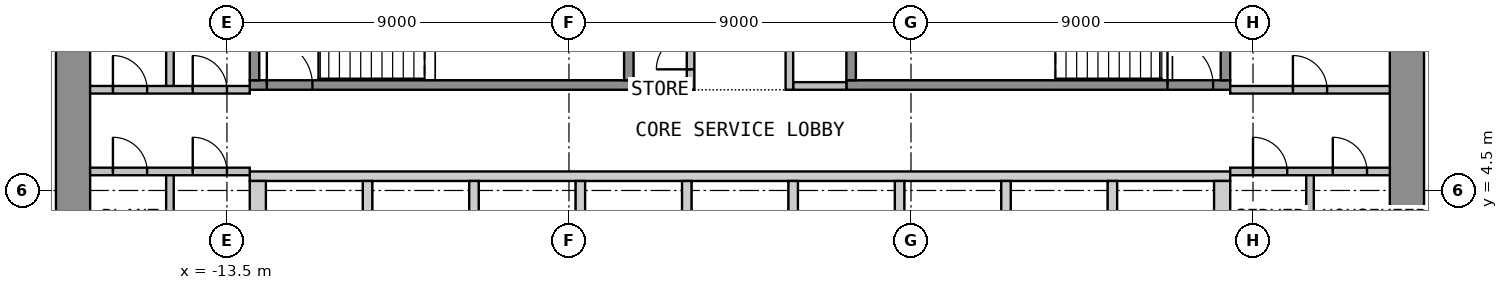
"""IFC4 building model, lengths in metres.
Left out: names, types, materials, properties, quantities, classifications, styles, units other than length and angle.
Written with IfcOpenShell. Run it as: python <this file> out.ifc"""

import sys

from ifc_helpers import new_model, si_unit, direction, frame, frame_2d, origin, place, context, subcontext, project, spatial, polyline, rectangle, outline, extrude, element, fill, save


model = new_model("IFC4")
c1 = context("Model", 3, precision=1e-05, world=origin(), true_north=direction((0.0, 1.0)))
c2 = subcontext(c1, "Body", "Model", "MODEL_VIEW")
j1 = project(units=[si_unit("LENGTHUNIT", "METRE"), si_unit("PLANEANGLEUNIT", "RADIAN")], contexts=[c1])
p1 = place(None, origin())
s1 = spatial("IfcSite", under=j1, at=p1, CompositionType="ELEMENT")
p2 = place(p1, origin())
s2 = spatial("IfcBuilding", under=s1, at=p2, CompositionType="ELEMENT")
p3 = place(p2, frame((0.0, 0.0, 81.3)))
s3 = spatial("IfcBuildingStorey", under=s2, at=p3, CompositionType="ELEMENT", Elevation=81.3)
p4 = place(p3, frame((-17.55, -12.6, 0.0), z_axis=(0.0, 0.0, 1.0), x_axis=(0.0, 1.0, 0.0)))
e1 = element("IfcWall", 1, at=p4, inside=s3, PredefinedType="SHEAR", context=c2, shape_type="SweptSolid", body=[
    extrude(rectangle(XDim=25.2, YDim=0.9, at=frame_2d((12.6, 0.0))), origin(), (0.0, 0.0, 1.0), 3.525),
])
p5 = place(p4, frame((11.4, 0.0, 0.0)))
e2 = element("IfcOpeningElement", 2, at=p5, cuts=e1, PredefinedType="OPENING", context=c2, shape_type="SweptSolid", body=[
    extrude(rectangle(XDim=2.4, YDim=2.1, at=frame_2d((1.2, 1.05))), frame((0.0, 0.46, 0.0), z_axis=(0.0, -1.0, 0.0), x_axis=(1.0, 0.0, 0.0)), (0.0, 0.0, 1.0), 0.92),
])
p6 = place(p3, frame((17.55, -12.6, 0.0), z_axis=(0.0, 0.0, 1.0), x_axis=(0.0, 1.0, 0.0)))
e3 = element("IfcWall", 3, at=p6, inside=s3, PredefinedType="SHEAR", context=c2, shape_type="SweptSolid", body=[
    extrude(rectangle(XDim=25.2, YDim=0.9, at=frame_2d((12.6, 0.0))), origin(), (0.0, 0.0, 1.0), 3.525),
])
p7 = place(p6, frame((11.4, 0.0, 0.0)))
e4 = element("IfcOpeningElement", 4, at=p7, cuts=e3, PredefinedType="OPENING", context=c2, shape_type="SweptSolid", body=[
    extrude(rectangle(XDim=2.4, YDim=2.1, at=frame_2d((1.2, 1.05))), frame((0.0, 0.46, 0.0), z_axis=(0.0, -1.0, 0.0), x_axis=(1.0, 0.0, 0.0)), (0.0, 0.0, 1.0), 0.92),
])
p8 = place(p3, origin())
e5 = element("IfcWall", 5, at=p8, inside=s3, PredefinedType="SHEAR", context=c2, shape_type="SweptSolid", body=[
    extrude(outline(polyline([(-12.9, 4.75), (12.9, 4.75), (12.9, 5.0), (-12.9, 5.0), (-12.9, 4.75)])), origin(), (0.0, 0.0, 1.0), 3.525),
])
p9 = place(p3, origin())
e6 = element("IfcWall", 6, at=p9, inside=s3, PredefinedType="SHEAR", context=c2, shape_type="SweptSolid", body=[
    extrude(outline(polyline([(-12.9, 2.05), (-12.475, 2.05), (-12.475, 4.75), (-12.9, 4.75), (-12.9, 2.05)])), origin(), (0.0, 0.0, 1.0), 3.525),
])
p10 = place(p3, origin())
e7 = element("IfcWall", 7, at=p10, inside=s3, PredefinedType="SHEAR", context=c2, shape_type="SweptSolid", body=[
    extrude(outline(polyline([(-9.925, 2.05), (-9.675, 2.05), (-9.675, 4.75), (-9.925, 4.75), (-9.925, 2.05)])), origin(), (0.0, 0.0, 1.0), 3.525),
])
p11 = place(p3, origin())
e8 = element("IfcWall", 8, at=p11, inside=s3, PredefinedType="SHEAR", context=c2, shape_type="SweptSolid", body=[
    extrude(outline(polyline([(-7.125, 2.05), (-6.875, 2.05), (-6.875, 4.75), (-7.125, 4.75), (-7.125, 2.05)])), origin(), (0.0, 0.0, 1.0), 3.525),
])
p12 = place(p3, origin())
e9 = element("IfcWall", 9, at=p12, inside=s3, PredefinedType="SHEAR", context=c2, shape_type="SweptSolid", body=[
    extrude(outline(polyline([(-4.325, 2.05), (-4.075, 2.05), (-4.075, 4.75), (-4.325, 4.75), (-4.325, 2.05)])), origin(), (0.0, 0.0, 1.0), 3.525),
])
p13 = place(p3, origin())
e10 = element("IfcWall", 10, at=p13, inside=s3, PredefinedType="SHEAR", context=c2, shape_type="SweptSolid", body=[
    extrude(outline(polyline([(-1.525, 2.05), (-1.275, 2.05), (-1.275, 4.75), (-1.525, 4.75), (-1.525, 2.05)])), origin(), (0.0, 0.0, 1.0), 3.525),
])
p14 = place(p3, origin())
e11 = element("IfcWall", 11, at=p14, inside=s3, PredefinedType="SHEAR", context=c2, shape_type="SweptSolid", body=[
    extrude(outline(polyline([(1.275, 2.05), (1.525, 2.05), (1.525, 4.75), (1.275, 4.75), (1.275, 2.05)])), origin(), (0.0, 0.0, 1.0), 3.525),
])
p15 = place(p3, origin())
e12 = element("IfcWall", 12, at=p15, inside=s3, PredefinedType="SHEAR", context=c2, shape_type="SweptSolid", body=[
    extrude(outline(polyline([(4.075, 2.05), (4.325, 2.05), (4.325, 4.75), (4.075, 4.75), (4.075, 2.05)])), origin(), (0.0, 0.0, 1.0), 3.525),
])
p16 = place(p3, origin())
e13 = element("IfcWall", 13, at=p16, inside=s3, PredefinedType="SHEAR", context=c2, shape_type="SweptSolid", body=[
    extrude(outline(polyline([(6.875, 2.05), (7.125, 2.05), (7.125, 4.75), (6.875, 4.75), (6.875, 2.05)])), origin(), (0.0, 0.0, 1.0), 3.525),
])
p17 = place(p3, origin())
e14 = element("IfcWall", 14, at=p17, inside=s3, PredefinedType="SHEAR", context=c2, shape_type="SweptSolid", body=[
    extrude(outline(polyline([(9.675, 2.05), (9.925, 2.05), (9.925, 4.75), (9.675, 4.75), (9.675, 2.05)])), origin(), (0.0, 0.0, 1.0), 3.525),
])
p18 = place(p3, origin())
e15 = element("IfcWall", 15, at=p18, inside=s3, PredefinedType="SHEAR", context=c2, shape_type="SweptSolid", body=[
    extrude(outline(polyline([(12.475, 2.05), (12.9, 2.05), (12.9, 4.75), (12.475, 4.75), (12.475, 2.05)])), origin(), (0.0, 0.0, 1.0), 3.525),
])
p19 = place(p3, frame((-12.9, 7.275, 0.0), z_axis=(0.0, 0.0, 1.0), x_axis=(1.0, 0.0, 0.0)))
e16 = element("IfcWall", 16, at=p19, inside=s3, PredefinedType="SHEAR", context=c2, shape_type="SweptSolid", body=[
    extrude(rectangle(XDim=10.1, YDim=0.25, at=frame_2d((5.05, 0.0))), origin(), (0.0, 0.0, 1.0), 3.525),
])
p20 = place(p19, frame((0.45, 0.0, 0.0)))
e17 = element("IfcOpeningElement", 17, at=p20, cuts=e16, PredefinedType="OPENING", context=c2, shape_type="SweptSolid", body=[
    extrude(rectangle(XDim=1.2, YDim=2.1, at=frame_2d((0.6, 1.05))), frame((0.0, 0.135, 0.0), z_axis=(0.0, -1.0, 0.0), x_axis=(1.0, 0.0, 0.0)), (0.0, 0.0, 1.0), 0.27),
])
for number, where, z_axis, x_axis in (
    (18, (-12.775, 7.4, 0.0), (0.0, 0.0, 1.0), (0.0, 1.0, 0.0)),
    (19, (-2.925, 7.4, 0.0), (0.0, 0.0, 1.0), (0.0, 1.0, 0.0)),
):
    element("IfcWall", number, at=place(p3, frame(where, z_axis=z_axis, x_axis=x_axis)), inside=s3, PredefinedType="SHEAR", context=c2, shape_type="SweptSolid", body=[
        extrude(rectangle(XDim=3.25, YDim=0.25, at=frame_2d((1.625, 0.0))), origin(), (0.0, 0.0, 1.0), 3.525),
    ])
p21 = place(p3, frame((2.8, 7.275, 0.0), z_axis=(0.0, 0.0, 1.0), x_axis=(1.0, 0.0, 0.0)))
e20 = element("IfcWall", 20, at=p21, inside=s3, PredefinedType="SHEAR", context=c2, shape_type="SweptSolid", body=[
    extrude(rectangle(XDim=10.1, YDim=0.25, at=frame_2d((5.05, 0.0))), origin(), (0.0, 0.0, 1.0), 3.525),
])
p22 = place(p21, frame((8.45, 0.0, 0.0)))
e21 = element("IfcOpeningElement", 21, at=p22, cuts=e20, PredefinedType="OPENING", context=c2, shape_type="SweptSolid", body=[
    extrude(rectangle(XDim=1.2, YDim=2.1, at=frame_2d((0.6, 1.05))), frame((0.0, 0.135, 0.0), z_axis=(0.0, -1.0, 0.0), x_axis=(1.0, 0.0, 0.0)), (0.0, 0.0, 1.0), 0.27),
])
for number, where, z_axis, x_axis in (
    (22, (2.925, 7.4, 0.0), (0.0, 0.0, 1.0), (0.0, 1.0, 0.0)),
    (23, (12.775, 7.4, 0.0), (0.0, 0.0, 1.0), (0.0, 1.0, 0.0)),
):
    element("IfcWall", number, at=place(p3, frame(where, z_axis=z_axis, x_axis=x_axis)), inside=s3, PredefinedType="SHEAR", context=c2, shape_type="SweptSolid", body=[
        extrude(rectangle(XDim=3.25, YDim=0.25, at=frame_2d((1.625, 0.0))), origin(), (0.0, 0.0, 1.0), 3.525),
    ])
for number, where, z_axis, x_axis in (
    (24, (-2.8, 7.25, 0.0), (0.0, 0.0, 1.0), (1.0, 0.0, 0.0)),
    (25, (1.4, 7.25, 0.0), (0.0, 0.0, 1.0), (1.0, 0.0, 0.0)),
):
    element("IfcWall", number, at=place(p3, frame(where, z_axis=z_axis, x_axis=x_axis)), inside=s3, PredefinedType="PARTITIONING", context=c2, shape_type="SweptSolid", body=[
        extrude(rectangle(XDim=1.4, YDim=0.2, at=frame_2d((0.7, 0.0))), origin(), (0.0, 0.0, 1.0), 3.525),
    ])
p23 = place(p3, frame((-1.3, 7.15, 0.0), z_axis=(0.0, 0.0, 1.0), x_axis=(0.0, 1.0, 0.0)))
e26 = element("IfcWall", 26, at=p23, inside=s3, PredefinedType="PARTITIONING", context=c2, shape_type="SweptSolid", body=[
    extrude(rectangle(XDim=5.45, YDim=0.2, at=frame_2d((2.725, 0.0))), origin(), (0.0, 0.0, 1.0), 3.525),
])
p24 = place(p23, frame((0.538, 0.0, 0.0)))
e27 = element("IfcOpeningElement", 27, at=p24, cuts=e26, PredefinedType="OPENING", context=c2, shape_type="SweptSolid", body=[
    extrude(rectangle(XDim=0.9, YDim=2.1, at=frame_2d((0.45, 1.05))), frame((0.0, 0.11, 0.0), z_axis=(0.0, -1.0, 0.0), x_axis=(1.0, 0.0, 0.0)), (0.0, 0.0, 1.0), 0.22),
])
p25 = place(p23, frame((3.163, 0.0, 0.0)))
e28 = element("IfcOpeningElement", 28, at=p25, cuts=e26, PredefinedType="OPENING", context=c2, shape_type="SweptSolid", body=[
    extrude(rectangle(XDim=0.9, YDim=2.1, at=frame_2d((0.45, 1.05))), frame((0.0, 0.11, 0.0), z_axis=(0.0, -1.0, 0.0), x_axis=(1.0, 0.0, 0.0)), (0.0, 0.0, 1.0), 0.22),
])
p26 = place(p3, frame((1.3, 7.15, 0.0), z_axis=(0.0, 0.0, 1.0), x_axis=(0.0, 1.0, 0.0)))
e29 = element("IfcWall", 29, at=p26, inside=s3, PredefinedType="PARTITIONING", context=c2, shape_type="SweptSolid", body=[
    extrude(rectangle(XDim=5.45, YDim=0.2, at=frame_2d((2.725, 0.0))), origin(), (0.0, 0.0, 1.0), 3.525),
])
p27 = place(p26, frame((2.375, 0.0, 0.0)))
e30 = element("IfcOpeningElement", 30, at=p27, cuts=e29, PredefinedType="OPENING", context=c2, shape_type="SweptSolid", body=[
    extrude(rectangle(XDim=0.9, YDim=2.1, at=frame_2d((0.45, 1.05))), frame((0.0, 0.11, 0.0), z_axis=(0.0, -1.0, 0.0), x_axis=(1.0, 0.0, 0.0)), (0.0, 0.0, 1.0), 0.22),
])
p28 = place(p3, frame((-15.0, 7.15, 0.0), z_axis=(0.0, 0.0, 1.0), x_axis=(0.0, 1.0, 0.0)))
e31 = element("IfcWall", 31, at=p28, inside=s3, PredefinedType="PARTITIONING", context=c2, shape_type="SweptSolid", body=[
    extrude(rectangle(XDim=5.45, YDim=0.2, at=frame_2d((2.725, 0.0))), origin(), (0.0, 0.0, 1.0), 3.525),
])
p29 = place(p3, frame((-17.1, 7.15, 0.0), z_axis=(0.0, 0.0, 1.0), x_axis=(1.0, 0.0, 0.0)))
e32 = element("IfcWall", 32, at=p29, inside=s3, PredefinedType="PARTITIONING", context=c2, shape_type="SweptSolid", body=[
    extrude(rectangle(XDim=4.2, YDim=0.2, at=frame_2d((2.1, 0.0))), origin(), (0.0, 0.0, 1.0), 3.525),
])
p30 = place(p29, frame((0.6, 0.0, 0.0)))
e33 = element("IfcOpeningElement", 33, at=p30, cuts=e32, PredefinedType="OPENING", context=c2, shape_type="SweptSolid", body=[
    extrude(rectangle(XDim=0.9, YDim=2.1, at=frame_2d((0.45, 1.05))), frame((0.0, 0.11, 0.0), z_axis=(0.0, -1.0, 0.0), x_axis=(1.0, 0.0, 0.0)), (0.0, 0.0, 1.0), 0.22),
])
p31 = place(p29, frame((2.7, 0.0, 0.0)))
e34 = element("IfcOpeningElement", 34, at=p31, cuts=e32, PredefinedType="OPENING", context=c2, shape_type="SweptSolid", body=[
    extrude(rectangle(XDim=0.9, YDim=2.1, at=frame_2d((0.45, 1.05))), frame((0.0, 0.11, 0.0), z_axis=(0.0, -1.0, 0.0), x_axis=(1.0, 0.0, 0.0)), (0.0, 0.0, 1.0), 0.22),
])
p32 = place(p3, frame((-15.0, 1.8, 0.0), z_axis=(0.0, 0.0, 1.0), x_axis=(0.0, 1.0, 0.0)))
e35 = element("IfcWall", 35, at=p32, inside=s3, PredefinedType="PARTITIONING", context=c2, shape_type="SweptSolid", body=[
    extrude(rectangle(XDim=3.2, YDim=0.2, at=frame_2d((1.6, 0.0))), origin(), (0.0, 0.0, 1.0), 3.525),
])
p33 = place(p3, frame((-17.1, 5.0, 0.0), z_axis=(0.0, 0.0, 1.0), x_axis=(1.0, 0.0, 0.0)))
e36 = element("IfcWall", 36, at=p33, inside=s3, PredefinedType="PARTITIONING", context=c2, shape_type="SweptSolid", body=[
    extrude(rectangle(XDim=4.2, YDim=0.2, at=frame_2d((2.1, 0.0))), origin(), (0.0, 0.0, 1.0), 3.525),
])
p34 = place(p33, frame((0.6, 0.0, 0.0)))
e37 = element("IfcOpeningElement", 37, at=p34, cuts=e36, PredefinedType="OPENING", context=c2, shape_type="SweptSolid", body=[
    extrude(rectangle(XDim=0.9, YDim=2.1, at=frame_2d((0.45, 1.05))), frame((0.0, 0.11, 0.0), z_axis=(0.0, -1.0, 0.0), x_axis=(1.0, 0.0, 0.0)), (0.0, 0.0, 1.0), 0.22),
])
p35 = place(p33, frame((2.7, 0.0, 0.0)))
e38 = element("IfcOpeningElement", 38, at=p35, cuts=e36, PredefinedType="OPENING", context=c2, shape_type="SweptSolid", body=[
    extrude(rectangle(XDim=0.9, YDim=2.1, at=frame_2d((0.45, 1.05))), frame((0.0, 0.11, 0.0), z_axis=(0.0, -1.0, 0.0), x_axis=(1.0, 0.0, 0.0)), (0.0, 0.0, 1.0), 0.22),
])
p36 = place(p3, frame((12.9, 7.15, 0.0), z_axis=(0.0, 0.0, 1.0), x_axis=(1.0, 0.0, 0.0)))
e39 = element("IfcWall", 39, at=p36, inside=s3, PredefinedType="PARTITIONING", context=c2, shape_type="SweptSolid", body=[
    extrude(rectangle(XDim=4.2, YDim=0.2, at=frame_2d((2.1, 0.0))), origin(), (0.0, 0.0, 1.0), 3.525),
])
p37 = place(p36, frame((1.65, 0.0, 0.0)))
e40 = element("IfcOpeningElement", 40, at=p37, cuts=e39, PredefinedType="OPENING", context=c2, shape_type="SweptSolid", body=[
    extrude(rectangle(XDim=0.9, YDim=2.1, at=frame_2d((0.45, 1.05))), frame((0.0, 0.11, 0.0), z_axis=(0.0, -1.0, 0.0), x_axis=(1.0, 0.0, 0.0)), (0.0, 0.0, 1.0), 0.22),
])
p38 = place(p3, frame((15.0, 1.8, 0.0), z_axis=(0.0, 0.0, 1.0), x_axis=(0.0, 1.0, 0.0)))
e41 = element("IfcWall", 41, at=p38, inside=s3, PredefinedType="PARTITIONING", context=c2, shape_type="SweptSolid", body=[
    extrude(rectangle(XDim=3.2, YDim=0.2, at=frame_2d((1.6, 0.0))), origin(), (0.0, 0.0, 1.0), 3.525),
])
p39 = place(p3, frame((12.9, 5.0, 0.0), z_axis=(0.0, 0.0, 1.0), x_axis=(1.0, 0.0, 0.0)))
e42 = element("IfcWall", 42, at=p39, inside=s3, PredefinedType="PARTITIONING", context=c2, shape_type="SweptSolid", body=[
    extrude(rectangle(XDim=4.2, YDim=0.2, at=frame_2d((2.1, 0.0))), origin(), (0.0, 0.0, 1.0), 3.525),
])
p40 = place(p39, frame((0.6, 0.0, 0.0)))
e43 = element("IfcOpeningElement", 43, at=p40, cuts=e42, PredefinedType="OPENING", context=c2, shape_type="SweptSolid", body=[
    extrude(rectangle(XDim=0.9, YDim=2.1, at=frame_2d((0.45, 1.05))), frame((0.0, 0.11, 0.0), z_axis=(0.0, -1.0, 0.0), x_axis=(1.0, 0.0, 0.0)), (0.0, 0.0, 1.0), 0.22),
])
p41 = place(p39, frame((2.7, 0.0, 0.0)))
e44 = element("IfcOpeningElement", 44, at=p41, cuts=e42, PredefinedType="OPENING", context=c2, shape_type="SweptSolid", body=[
    extrude(rectangle(XDim=0.9, YDim=2.1, at=frame_2d((0.45, 1.05))), frame((0.0, 0.11, 0.0), z_axis=(0.0, -1.0, 0.0), x_axis=(1.0, 0.0, 0.0)), (0.0, 0.0, 1.0), 0.22),
])
p42 = place(p20, origin())
e45 = element("IfcDoor", 45, at=p42, inside=s3, OperationType="SINGLE_SWING_LEFT", PredefinedType="DOOR", context=c2, shape_type="SweptSolid", body=[
    extrude(rectangle(XDim=1.2, YDim=2.1, at=frame_2d((0.6, 1.05))), frame((0.0, 0.025, 0.0), z_axis=(0.0, -1.0, 0.0), x_axis=(1.0, 0.0, 0.0)), (0.0, 0.0, 1.0), 0.05),
])
fill(e17, e45)
p43 = place(p22, origin())
e46 = element("IfcDoor", 46, at=p43, inside=s3, OperationType="SINGLE_SWING_LEFT", PredefinedType="DOOR", context=c2, shape_type="SweptSolid", body=[
    extrude(rectangle(XDim=1.2, YDim=2.1, at=frame_2d((0.6, 1.05))), frame((0.0, 0.025, 0.0), z_axis=(0.0, -1.0, 0.0), x_axis=(1.0, 0.0, 0.0)), (0.0, 0.0, 1.0), 0.05),
])
fill(e21, e46)
p44 = place(p24, origin())
e47 = element("IfcDoor", 47, at=p44, inside=s3, OperationType="SINGLE_SWING_LEFT", PredefinedType="DOOR", context=c2, shape_type="SweptSolid", body=[
    extrude(rectangle(XDim=0.9, YDim=2.1, at=frame_2d((0.45, 1.05))), frame((0.0, 0.025, 0.0), z_axis=(0.0, -1.0, 0.0), x_axis=(1.0, 0.0, 0.0)), (0.0, 0.0, 1.0), 0.05),
])
fill(e27, e47)
p45 = place(p30, origin())
e48 = element("IfcDoor", 48, at=p45, inside=s3, OperationType="SINGLE_SWING_LEFT", PredefinedType="DOOR", context=c2, shape_type="SweptSolid", body=[
    extrude(rectangle(XDim=0.9, YDim=2.1, at=frame_2d((0.45, 1.05))), frame((0.0, 0.025, 0.0), z_axis=(0.0, -1.0, 0.0), x_axis=(1.0, 0.0, 0.0)), (0.0, 0.0, 1.0), 0.05),
])
fill(e33, e48)
p46 = place(p31, origin())
e49 = element("IfcDoor", 49, at=p46, inside=s3, OperationType="SINGLE_SWING_LEFT", PredefinedType="DOOR", context=c2, shape_type="SweptSolid", body=[
    extrude(rectangle(XDim=0.9, YDim=2.1, at=frame_2d((0.45, 1.05))), frame((0.0, 0.025, 0.0), z_axis=(0.0, -1.0, 0.0), x_axis=(1.0, 0.0, 0.0)), (0.0, 0.0, 1.0), 0.05),
])
fill(e34, e49)
p47 = place(p34, origin())
e50 = element("IfcDoor", 50, at=p47, inside=s3, OperationType="SINGLE_SWING_LEFT", PredefinedType="DOOR", context=c2, shape_type="SweptSolid", body=[
    extrude(rectangle(XDim=0.9, YDim=2.1, at=frame_2d((0.45, 1.05))), frame((0.0, 0.025, 0.0), z_axis=(0.0, -1.0, 0.0), x_axis=(1.0, 0.0, 0.0)), (0.0, 0.0, 1.0), 0.05),
])
fill(e37, e50)
p48 = place(p35, origin())
e51 = element("IfcDoor", 51, at=p48, inside=s3, OperationType="SINGLE_SWING_LEFT", PredefinedType="DOOR", context=c2, shape_type="SweptSolid", body=[
    extrude(rectangle(XDim=0.9, YDim=2.1, at=frame_2d((0.45, 1.05))), frame((0.0, 0.025, 0.0), z_axis=(0.0, -1.0, 0.0), x_axis=(1.0, 0.0, 0.0)), (0.0, 0.0, 1.0), 0.05),
])
fill(e38, e51)
p49 = place(p37, origin())
e52 = element("IfcDoor", 52, at=p49, inside=s3, OperationType="SINGLE_SWING_LEFT", PredefinedType="DOOR", context=c2, shape_type="SweptSolid", body=[
    extrude(rectangle(XDim=0.9, YDim=2.1, at=frame_2d((0.45, 1.05))), frame((0.0, 0.025, 0.0), z_axis=(0.0, -1.0, 0.0), x_axis=(1.0, 0.0, 0.0)), (0.0, 0.0, 1.0), 0.05),
])
fill(e40, e52)
p50 = place(p40, origin())
e53 = element("IfcDoor", 53, at=p50, inside=s3, OperationType="SINGLE_SWING_LEFT", PredefinedType="DOOR", context=c2, shape_type="SweptSolid", body=[
    extrude(rectangle(XDim=0.9, YDim=2.1, at=frame_2d((0.45, 1.05))), frame((0.0, 0.025, 0.0), z_axis=(0.0, -1.0, 0.0), x_axis=(1.0, 0.0, 0.0)), (0.0, 0.0, 1.0), 0.05),
])
fill(e43, e53)
p51 = place(p41, origin())
e54 = element("IfcDoor", 54, at=p51, inside=s3, OperationType="SINGLE_SWING_LEFT", PredefinedType="DOOR", context=c2, shape_type="SweptSolid", body=[
    extrude(rectangle(XDim=0.9, YDim=2.1, at=frame_2d((0.45, 1.05))), frame((0.0, 0.025, 0.0), z_axis=(0.0, -1.0, 0.0), x_axis=(1.0, 0.0, 0.0)), (0.0, 0.0, 1.0), 0.05),
])
fill(e44, e54)
save(model, sys.argv[1])
